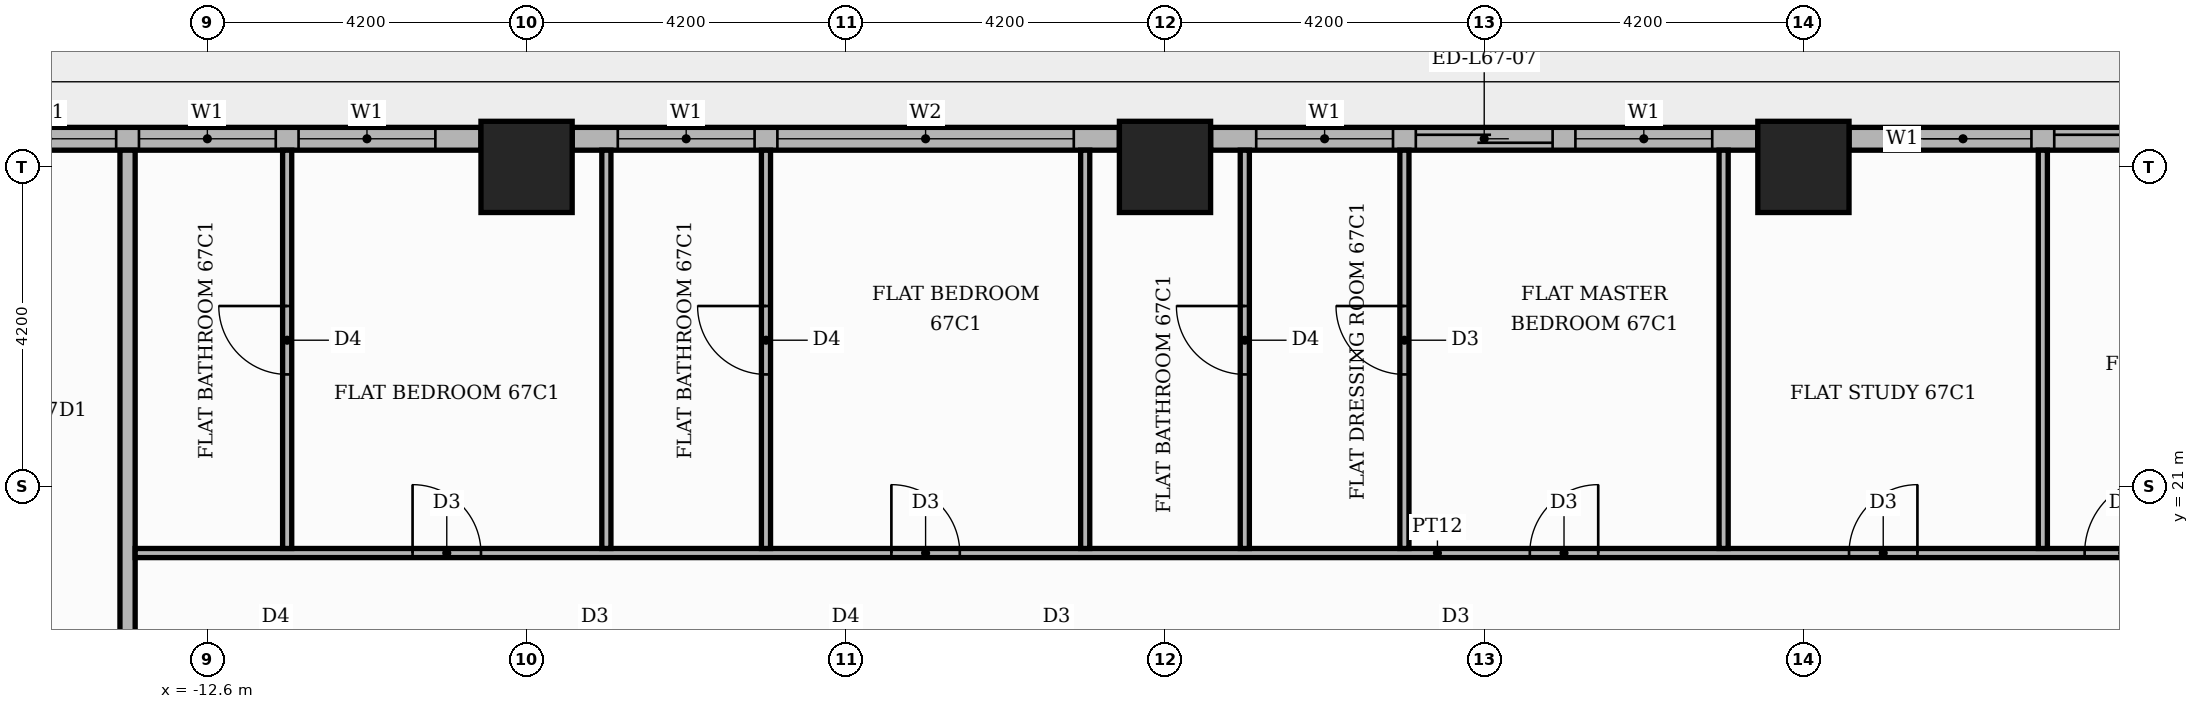
"""IFC4 building model, lengths in metres.
Left out: names, types, materials, properties, quantities, classifications, styles, units other than length and angle.
Written with IfcOpenShell. Run it as: python <this file> out.ifc"""

import sys

from ifc_helpers import new_model, si_unit, direction, frame, frame_2d, origin, origin_2d, place, context, subcontext, project, spatial, rectangle, extrude, element, fill, save


model = new_model("IFC4")
c1 = context("Model", 3, precision=1e-05, world=origin(), true_north=direction((0.0, 1.0)))
c2 = subcontext(c1, "Body", "Model", "MODEL_VIEW")
j1 = project(units=[si_unit("LENGTHUNIT", "METRE"), si_unit("PLANEANGLEUNIT", "RADIAN")], contexts=[c1])
p1 = place(None, origin())
s1 = spatial("IfcSite", under=j1, at=p1, CompositionType="ELEMENT")
p2 = place(p1, origin())
s2 = spatial("IfcBuilding", under=s1, at=p2, CompositionType="ELEMENT")
p3 = place(p2, frame((0.0, 0.0, 279.6)))
s3 = spatial("IfcBuildingStorey", under=s2, at=p3, CompositionType="ELEMENT", Elevation=279.6)
for number, where, z_axis, x_axis in (
    (1, (0.0, 25.2, 0.0), (0.0, 0.0, 1.0), (1.0, 0.0, 0.0)),
    (2, (-8.4, 25.2, 0.0), (0.0, 0.0, 1.0), (1.0, 0.0, 0.0)),
    (3, (8.4, 25.2, 0.0), (0.0, 0.0, 1.0), (1.0, 0.0, 0.0)),
):
    element("IfcColumn", number, at=place(p3, frame(where, z_axis=z_axis, x_axis=x_axis)), inside=s3, PredefinedType="COLUMN", context=c2, shape_type="SweptSolid", body=[
        extrude(rectangle(XDim=1.2, YDim=1.2, at=origin_2d()), origin(), (0.0, 0.0, 1.0), 3.9),
    ])
p4 = place(p3, frame((16.2, 25.57, 0.0), z_axis=(0.0, 0.0, 1.0), x_axis=(-1.0, 0.0, 0.0)))
e4 = element("IfcWall", 4, at=p4, inside=s3, PredefinedType="STANDARD", context=c2, shape_type="SweptSolid", body=[
    extrude(rectangle(XDim=7.2, YDim=0.3, at=frame_2d((3.6, 0.0))), origin(), (0.0, 0.0, 1.0), 3.48),
])
p5 = place(p4, frame((0.6, 0.0, 0.0)))
e5 = element("IfcOpeningElement", 5, at=p5, cuts=e4, PredefinedType="OPENING", context=c2, shape_type="SweptSolid", body=[
    extrude(rectangle(XDim=3.9, YDim=2.4, at=frame_2d((1.95, 1.2))), frame((0.0, 0.16, 0.0), z_axis=(0.0, -1.0, 0.0), x_axis=(1.0, 0.0, 0.0)), (0.0, 0.0, 1.0), 0.32),
])
p6 = place(p4, frame((4.8, 0.0, 0.9)))
e6 = element("IfcOpeningElement", 6, at=p6, cuts=e4, PredefinedType="OPENING", context=c2, shape_type="SweptSolid", body=[
    extrude(rectangle(XDim=1.8, YDim=2.1, at=frame_2d((0.9, 1.05))), frame((0.0, 0.16, 0.0), z_axis=(0.0, -1.0, 0.0), x_axis=(1.0, 0.0, 0.0)), (0.0, 0.0, 1.0), 0.32),
])
p7 = place(p3, frame((7.8, 25.57, 0.0), z_axis=(0.0, 0.0, 1.0), x_axis=(-1.0, 0.0, 0.0)))
e7 = element("IfcWall", 7, at=p7, inside=s3, PredefinedType="STANDARD", context=c2, shape_type="SweptSolid", body=[
    extrude(rectangle(XDim=7.2, YDim=0.3, at=frame_2d((3.6, 0.0))), origin(), (0.0, 0.0, 1.0), 3.48),
])
p8 = place(p7, frame((0.6, 0.0, 0.9)))
e8 = element("IfcOpeningElement", 8, at=p8, cuts=e7, PredefinedType="OPENING", context=c2, shape_type="SweptSolid", body=[
    extrude(rectangle(XDim=1.8, YDim=2.1, at=frame_2d((0.9, 1.05))), frame((0.0, 0.16, 0.0), z_axis=(0.0, -1.0, 0.0), x_axis=(1.0, 0.0, 0.0)), (0.0, 0.0, 1.0), 0.32),
])
p9 = place(p7, frame((2.7, 0.0, 0.0)))
e9 = element("IfcOpeningElement", 9, at=p9, cuts=e7, PredefinedType="OPENING", context=c2, shape_type="SweptSolid", body=[
    extrude(rectangle(XDim=1.8, YDim=2.4, at=frame_2d((0.9, 1.2))), frame((0.0, 0.16, 0.0), z_axis=(0.0, -1.0, 0.0), x_axis=(1.0, 0.0, 0.0)), (0.0, 0.0, 1.0), 0.32),
])
p10 = place(p7, frame((4.8, 0.0, 0.9)))
e10 = element("IfcOpeningElement", 10, at=p10, cuts=e7, PredefinedType="OPENING", context=c2, shape_type="SweptSolid", body=[
    extrude(rectangle(XDim=1.8, YDim=2.1, at=frame_2d((0.9, 1.05))), frame((0.0, 0.16, 0.0), z_axis=(0.0, -1.0, 0.0), x_axis=(1.0, 0.0, 0.0)), (0.0, 0.0, 1.0), 0.32),
])
p11 = place(p3, frame((-0.6, 25.57, 0.0), z_axis=(0.0, 0.0, 1.0), x_axis=(-1.0, 0.0, 0.0)))
e11 = element("IfcWall", 11, at=p11, inside=s3, PredefinedType="STANDARD", context=c2, shape_type="SweptSolid", body=[
    extrude(rectangle(XDim=7.2, YDim=0.3, at=frame_2d((3.6, 0.0))), origin(), (0.0, 0.0, 1.0), 3.48),
])
p12 = place(p11, frame((0.6, 0.0, 0.9)))
e12 = element("IfcOpeningElement", 12, at=p12, cuts=e11, PredefinedType="OPENING", context=c2, shape_type="SweptSolid", body=[
    extrude(rectangle(XDim=3.9, YDim=2.1, at=frame_2d((1.95, 1.05))), frame((0.0, 0.16, 0.0), z_axis=(0.0, -1.0, 0.0), x_axis=(1.0, 0.0, 0.0)), (0.0, 0.0, 1.0), 0.32),
])
p13 = place(p11, frame((4.8, 0.0, 0.9)))
e13 = element("IfcOpeningElement", 13, at=p13, cuts=e11, PredefinedType="OPENING", context=c2, shape_type="SweptSolid", body=[
    extrude(rectangle(XDim=1.8, YDim=2.1, at=frame_2d((0.9, 1.05))), frame((0.0, 0.16, 0.0), z_axis=(0.0, -1.0, 0.0), x_axis=(1.0, 0.0, 0.0)), (0.0, 0.0, 1.0), 0.32),
])
p14 = place(p3, frame((-9.0, 25.57, 0.0), z_axis=(0.0, 0.0, 1.0), x_axis=(-1.0, 0.0, 0.0)))
e14 = element("IfcWall", 14, at=p14, inside=s3, PredefinedType="STANDARD", context=c2, shape_type="SweptSolid", body=[
    extrude(rectangle(XDim=7.2, YDim=0.3, at=frame_2d((3.6, 0.0))), origin(), (0.0, 0.0, 1.0), 3.48),
])
p15 = place(p14, frame((0.6, 0.0, 0.9)))
e15 = element("IfcOpeningElement", 15, at=p15, cuts=e14, PredefinedType="OPENING", context=c2, shape_type="SweptSolid", body=[
    extrude(rectangle(XDim=1.8, YDim=2.1, at=frame_2d((0.9, 1.05))), frame((0.0, 0.16, 0.0), z_axis=(0.0, -1.0, 0.0), x_axis=(1.0, 0.0, 0.0)), (0.0, 0.0, 1.0), 0.32),
])
p16 = place(p14, frame((2.7, 0.0, 0.9)))
e16 = element("IfcOpeningElement", 16, at=p16, cuts=e14, PredefinedType="OPENING", context=c2, shape_type="SweptSolid", body=[
    extrude(rectangle(XDim=1.8, YDim=2.1, at=frame_2d((0.9, 1.05))), frame((0.0, 0.16, 0.0), z_axis=(0.0, -1.0, 0.0), x_axis=(1.0, 0.0, 0.0)), (0.0, 0.0, 1.0), 0.32),
])
p17 = place(p14, frame((4.8, 0.0, 0.9)))
e17 = element("IfcOpeningElement", 17, at=p17, cuts=e14, PredefinedType="OPENING", context=c2, shape_type="SweptSolid", body=[
    extrude(rectangle(XDim=1.8, YDim=2.1, at=frame_2d((0.9, 1.05))), frame((0.0, 0.16, 0.0), z_axis=(0.0, -1.0, 0.0), x_axis=(1.0, 0.0, 0.0)), (0.0, 0.0, 1.0), 0.32),
])
p18 = place(p3, frame((-13.65, 13.75, 0.0), z_axis=(0.0, 0.0, 1.0), x_axis=(0.0, 1.0, 0.0)))
e18 = element("IfcWall", 18, at=p18, inside=s3, PredefinedType="PARTITIONING", context=c2, shape_type="SweptSolid", body=[
    extrude(rectangle(XDim=11.67, YDim=0.2, at=frame_2d((5.835, 0.0))), origin(), (0.0, 0.0, 1.0), 3.48),
])
p19 = place(p3, frame((-13.55, 20.12, 0.0), z_axis=(0.0, 0.0, 1.0), x_axis=(1.0, 0.0, 0.0)))
e19 = element("IfcWall", 19, at=p19, inside=s3, PredefinedType="PARTITIONING", context=c2, shape_type="SweptSolid", body=[
    extrude(rectangle(XDim=34.269, YDim=0.12, at=frame_2d((17.135, 0.0))), origin(), (0.0, 0.0, 1.0), 3.48),
])
p20 = place(p19, frame((25.65, 0.0, 0.0)))
e20 = element("IfcOpeningElement", 20, at=p20, cuts=e19, PredefinedType="OPENING", context=c2, shape_type="SweptSolid", body=[
    extrude(rectangle(XDim=1.0, YDim=2.1, at=frame_2d((0.5, 1.05))), frame((0.0, 0.07, 0.0), z_axis=(0.0, -1.0, 0.0), x_axis=(1.0, 0.0, 0.0)), (0.0, 0.0, 1.0), 0.14),
])
p21 = place(p19, frame((22.55, 0.0, 0.0)))
e21 = element("IfcOpeningElement", 21, at=p21, cuts=e19, PredefinedType="OPENING", context=c2, shape_type="SweptSolid", body=[
    extrude(rectangle(XDim=0.9, YDim=2.1, at=frame_2d((0.45, 1.05))), frame((0.0, 0.07, 0.0), z_axis=(0.0, -1.0, 0.0), x_axis=(1.0, 0.0, 0.0)), (0.0, 0.0, 1.0), 0.14),
])
p22 = place(p19, frame((18.35, 0.0, 0.0)))
e22 = element("IfcOpeningElement", 22, at=p22, cuts=e19, PredefinedType="OPENING", context=c2, shape_type="SweptSolid", body=[
    extrude(rectangle(XDim=0.9, YDim=2.1, at=frame_2d((0.45, 1.05))), frame((0.0, 0.07, 0.0), z_axis=(0.0, -1.0, 0.0), x_axis=(1.0, 0.0, 0.0)), (0.0, 0.0, 1.0), 0.14),
])
p23 = place(p19, frame((9.95, 0.0, 0.0)))
e23 = element("IfcOpeningElement", 23, at=p23, cuts=e19, PredefinedType="OPENING", context=c2, shape_type="SweptSolid", body=[
    extrude(rectangle(XDim=0.9, YDim=2.1, at=frame_2d((0.45, 1.05))), frame((0.0, 0.07, 0.0), z_axis=(0.0, -1.0, 0.0), x_axis=(1.0, 0.0, 0.0)), (0.0, 0.0, 1.0), 0.14),
])
p24 = place(p19, frame((3.65, 0.0, 0.0)))
e24 = element("IfcOpeningElement", 24, at=p24, cuts=e19, PredefinedType="OPENING", context=c2, shape_type="SweptSolid", body=[
    extrude(rectangle(XDim=0.9, YDim=2.1, at=frame_2d((0.45, 1.05))), frame((0.0, 0.07, 0.0), z_axis=(0.0, -1.0, 0.0), x_axis=(1.0, 0.0, 0.0)), (0.0, 0.0, 1.0), 0.14),
])
p25 = place(p3, frame((-11.55, 20.18, 0.0), z_axis=(0.0, 0.0, 1.0), x_axis=(0.0, 1.0, 0.0)))
e25 = element("IfcWall", 25, at=p25, inside=s3, PredefinedType="PARTITIONING", context=c2, shape_type="SweptSolid", body=[
    extrude(rectangle(XDim=5.24, YDim=0.12, at=frame_2d((2.62, 0.0))), origin(), (0.0, 0.0, 1.0), 3.48),
])
p26 = place(p25, frame((2.29, 0.0, 0.0)))
e26 = element("IfcOpeningElement", 26, at=p26, cuts=e25, PredefinedType="OPENING", context=c2, shape_type="SweptSolid", body=[
    extrude(rectangle(XDim=0.9, YDim=2.1, at=frame_2d((0.45, 1.05))), frame((0.0, 0.07, 0.0), z_axis=(0.0, -1.0, 0.0), x_axis=(1.0, 0.0, 0.0)), (0.0, 0.0, 1.0), 0.14),
])
p27 = place(p3, frame((-7.35, 20.18, 0.0), z_axis=(0.0, 0.0, 1.0), x_axis=(0.0, 1.0, 0.0)))
e27 = element("IfcWall", 27, at=p27, inside=s3, PredefinedType="PARTITIONING", context=c2, shape_type="SweptSolid", body=[
    extrude(rectangle(XDim=5.24, YDim=0.12, at=frame_2d((2.62, 0.0))), origin(), (0.0, 0.0, 1.0), 3.48),
])
p28 = place(p3, frame((-5.25, 20.18, 0.0), z_axis=(0.0, 0.0, 1.0), x_axis=(0.0, 1.0, 0.0)))
e28 = element("IfcWall", 28, at=p28, inside=s3, PredefinedType="PARTITIONING", context=c2, shape_type="SweptSolid", body=[
    extrude(rectangle(XDim=5.24, YDim=0.12, at=frame_2d((2.62, 0.0))), origin(), (0.0, 0.0, 1.0), 3.48),
])
p29 = place(p28, frame((2.29, 0.0, 0.0)))
e29 = element("IfcOpeningElement", 29, at=p29, cuts=e28, PredefinedType="OPENING", context=c2, shape_type="SweptSolid", body=[
    extrude(rectangle(XDim=0.9, YDim=2.1, at=frame_2d((0.45, 1.05))), frame((0.0, 0.07, 0.0), z_axis=(0.0, -1.0, 0.0), x_axis=(1.0, 0.0, 0.0)), (0.0, 0.0, 1.0), 0.14),
])
p30 = place(p3, frame((-1.05, 20.18, 0.0), z_axis=(0.0, 0.0, 1.0), x_axis=(0.0, 1.0, 0.0)))
e30 = element("IfcWall", 30, at=p30, inside=s3, PredefinedType="PARTITIONING", context=c2, shape_type="SweptSolid", body=[
    extrude(rectangle(XDim=5.24, YDim=0.12, at=frame_2d((2.62, 0.0))), origin(), (0.0, 0.0, 1.0), 3.48),
])
p31 = place(p3, frame((1.05, 20.18, 0.0), z_axis=(0.0, 0.0, 1.0), x_axis=(0.0, 1.0, 0.0)))
e31 = element("IfcWall", 31, at=p31, inside=s3, PredefinedType="PARTITIONING", context=c2, shape_type="SweptSolid", body=[
    extrude(rectangle(XDim=5.24, YDim=0.12, at=frame_2d((2.62, 0.0))), origin(), (0.0, 0.0, 1.0), 3.48),
])
p32 = place(p31, frame((2.29, 0.0, 0.0)))
e32 = element("IfcOpeningElement", 32, at=p32, cuts=e31, PredefinedType="OPENING", context=c2, shape_type="SweptSolid", body=[
    extrude(rectangle(XDim=0.9, YDim=2.1, at=frame_2d((0.45, 1.05))), frame((0.0, 0.07, 0.0), z_axis=(0.0, -1.0, 0.0), x_axis=(1.0, 0.0, 0.0)), (0.0, 0.0, 1.0), 0.14),
])
p33 = place(p3, frame((3.15, 20.18, 0.0), z_axis=(0.0, 0.0, 1.0), x_axis=(0.0, 1.0, 0.0)))
e33 = element("IfcWall", 33, at=p33, inside=s3, PredefinedType="PARTITIONING", context=c2, shape_type="SweptSolid", body=[
    extrude(rectangle(XDim=5.24, YDim=0.12, at=frame_2d((2.62, 0.0))), origin(), (0.0, 0.0, 1.0), 3.48),
])
p34 = place(p33, frame((2.29, 0.0, 0.0)))
e34 = element("IfcOpeningElement", 34, at=p34, cuts=e33, PredefinedType="OPENING", context=c2, shape_type="SweptSolid", body=[
    extrude(rectangle(XDim=0.9, YDim=2.1, at=frame_2d((0.45, 1.05))), frame((0.0, 0.07, 0.0), z_axis=(0.0, -1.0, 0.0), x_axis=(1.0, 0.0, 0.0)), (0.0, 0.0, 1.0), 0.14),
])
for number, where, z_axis, x_axis in (
    (35, (7.35, 20.18, 0.0), (0.0, 0.0, 1.0), (0.0, 1.0, 0.0)),
    (36, (11.55, 20.18, 0.0), (0.0, 0.0, 1.0), (0.0, 1.0, 0.0)),
):
    element("IfcWall", number, at=place(p3, frame(where, z_axis=z_axis, x_axis=x_axis)), inside=s3, PredefinedType="PARTITIONING", context=c2, shape_type="SweptSolid", body=[
        extrude(rectangle(XDim=5.24, YDim=0.12, at=frame_2d((2.62, 0.0))), origin(), (0.0, 0.0, 1.0), 3.48),
    ])
p35 = place(p5, origin())
e37 = element("IfcDoor", 37, at=p35, inside=s3, OperationType="SLIDING_TO_LEFT", PredefinedType="DOOR", context=c2, shape_type="SweptSolid", body=[
    extrude(rectangle(XDim=3.9, YDim=2.4, at=frame_2d((1.95, 1.2))), frame((0.0, 0.025, 0.0), z_axis=(0.0, -1.0, 0.0), x_axis=(1.0, 0.0, 0.0)), (0.0, 0.0, 1.0), 0.05),
])
fill(e5, e37)
p36 = place(p6, origin())
e38 = element("IfcWindow", 38, at=p36, inside=s3, PartitioningType="SINGLE_PANEL", PredefinedType="WINDOW", context=c2, shape_type="SweptSolid", body=[
    extrude(rectangle(XDim=1.8, YDim=2.1, at=frame_2d((0.9, 1.05))), frame((0.0, 0.03, 0.0), z_axis=(0.0, -1.0, 0.0), x_axis=(1.0, 0.0, 0.0)), (0.0, 0.0, 1.0), 0.06),
])
fill(e6, e38)
p37 = place(p8, origin())
e39 = element("IfcWindow", 39, at=p37, inside=s3, PartitioningType="SINGLE_PANEL", PredefinedType="WINDOW", context=c2, shape_type="SweptSolid", body=[
    extrude(rectangle(XDim=1.8, YDim=2.1, at=frame_2d((0.9, 1.05))), frame((0.0, 0.03, 0.0), z_axis=(0.0, -1.0, 0.0), x_axis=(1.0, 0.0, 0.0)), (0.0, 0.0, 1.0), 0.06),
])
fill(e8, e39)
p38 = place(p9, origin())
e40 = element("IfcDoor", 40, at=p38, inside=s3, OperationType="SLIDING_TO_LEFT", PredefinedType="DOOR", context=c2, shape_type="SweptSolid", body=[
    extrude(rectangle(XDim=1.8, YDim=2.4, at=frame_2d((0.9, 1.2))), frame((0.0, 0.025, 0.0), z_axis=(0.0, -1.0, 0.0), x_axis=(1.0, 0.0, 0.0)), (0.0, 0.0, 1.0), 0.05),
])
fill(e9, e40)
p39 = place(p10, origin())
e41 = element("IfcWindow", 41, at=p39, inside=s3, PartitioningType="SINGLE_PANEL", PredefinedType="WINDOW", context=c2, shape_type="SweptSolid", body=[
    extrude(rectangle(XDim=1.8, YDim=2.1, at=frame_2d((0.9, 1.05))), frame((0.0, 0.03, 0.0), z_axis=(0.0, -1.0, 0.0), x_axis=(1.0, 0.0, 0.0)), (0.0, 0.0, 1.0), 0.06),
])
fill(e10, e41)
p40 = place(p12, origin())
e42 = element("IfcWindow", 42, at=p40, inside=s3, PartitioningType="SINGLE_PANEL", PredefinedType="WINDOW", context=c2, shape_type="SweptSolid", body=[
    extrude(rectangle(XDim=3.9, YDim=2.1, at=frame_2d((1.95, 1.05))), frame((0.0, 0.03, 0.0), z_axis=(0.0, -1.0, 0.0), x_axis=(1.0, 0.0, 0.0)), (0.0, 0.0, 1.0), 0.06),
])
fill(e12, e42)
p41 = place(p13, origin())
e43 = element("IfcWindow", 43, at=p41, inside=s3, PartitioningType="SINGLE_PANEL", PredefinedType="WINDOW", context=c2, shape_type="SweptSolid", body=[
    extrude(rectangle(XDim=1.8, YDim=2.1, at=frame_2d((0.9, 1.05))), frame((0.0, 0.03, 0.0), z_axis=(0.0, -1.0, 0.0), x_axis=(1.0, 0.0, 0.0)), (0.0, 0.0, 1.0), 0.06),
])
fill(e13, e43)
p42 = place(p15, origin())
e44 = element("IfcWindow", 44, at=p42, inside=s3, PartitioningType="SINGLE_PANEL", PredefinedType="WINDOW", context=c2, shape_type="SweptSolid", body=[
    extrude(rectangle(XDim=1.8, YDim=2.1, at=frame_2d((0.9, 1.05))), frame((0.0, 0.03, 0.0), z_axis=(0.0, -1.0, 0.0), x_axis=(1.0, 0.0, 0.0)), (0.0, 0.0, 1.0), 0.06),
])
fill(e15, e44)
p43 = place(p16, origin())
e45 = element("IfcWindow", 45, at=p43, inside=s3, PartitioningType="SINGLE_PANEL", PredefinedType="WINDOW", context=c2, shape_type="SweptSolid", body=[
    extrude(rectangle(XDim=1.8, YDim=2.1, at=frame_2d((0.9, 1.05))), frame((0.0, 0.03, 0.0), z_axis=(0.0, -1.0, 0.0), x_axis=(1.0, 0.0, 0.0)), (0.0, 0.0, 1.0), 0.06),
])
fill(e16, e45)
p44 = place(p17, origin())
e46 = element("IfcWindow", 46, at=p44, inside=s3, PartitioningType="SINGLE_PANEL", PredefinedType="WINDOW", context=c2, shape_type="SweptSolid", body=[
    extrude(rectangle(XDim=1.8, YDim=2.1, at=frame_2d((0.9, 1.05))), frame((0.0, 0.03, 0.0), z_axis=(0.0, -1.0, 0.0), x_axis=(1.0, 0.0, 0.0)), (0.0, 0.0, 1.0), 0.06),
])
fill(e17, e46)
p45 = place(p20, origin())
e47 = element("IfcDoor", 47, at=p45, inside=s3, OperationType="SINGLE_SWING_RIGHT", PredefinedType="DOOR", context=c2, shape_type="SweptSolid", body=[
    extrude(rectangle(XDim=1.0, YDim=2.1, at=frame_2d((0.5, 1.05))), frame((0.0, 0.025, 0.0), z_axis=(0.0, -1.0, 0.0), x_axis=(1.0, 0.0, 0.0)), (0.0, 0.0, 1.0), 0.05),
])
fill(e20, e47)
p46 = place(p21, origin())
e48 = element("IfcDoor", 48, at=p46, inside=s3, OperationType="SINGLE_SWING_RIGHT", PredefinedType="DOOR", context=c2, shape_type="SweptSolid", body=[
    extrude(rectangle(XDim=0.9, YDim=2.1, at=frame_2d((0.45, 1.05))), frame((0.0, 0.025, 0.0), z_axis=(0.0, -1.0, 0.0), x_axis=(1.0, 0.0, 0.0)), (0.0, 0.0, 1.0), 0.05),
])
fill(e21, e48)
p47 = place(p22, origin())
e49 = element("IfcDoor", 49, at=p47, inside=s3, OperationType="SINGLE_SWING_RIGHT", PredefinedType="DOOR", context=c2, shape_type="SweptSolid", body=[
    extrude(rectangle(XDim=0.9, YDim=2.1, at=frame_2d((0.45, 1.05))), frame((0.0, 0.025, 0.0), z_axis=(0.0, -1.0, 0.0), x_axis=(1.0, 0.0, 0.0)), (0.0, 0.0, 1.0), 0.05),
])
fill(e22, e49)
p48 = place(p34, origin())
e50 = element("IfcDoor", 50, at=p48, inside=s3, OperationType="SINGLE_SWING_RIGHT", PredefinedType="DOOR", context=c2, shape_type="SweptSolid", body=[
    extrude(rectangle(XDim=0.9, YDim=2.1, at=frame_2d((0.45, 1.05))), frame((0.0, 0.025, 0.0), z_axis=(0.0, -1.0, 0.0), x_axis=(1.0, 0.0, 0.0)), (0.0, 0.0, 1.0), 0.05),
])
fill(e34, e50)
p49 = place(p32, origin())
e51 = element("IfcDoor", 51, at=p49, inside=s3, OperationType="SINGLE_SWING_RIGHT", PredefinedType="DOOR", context=c2, shape_type="SweptSolid", body=[
    extrude(rectangle(XDim=0.9, YDim=2.1, at=frame_2d((0.45, 1.05))), frame((0.0, 0.025, 0.0), z_axis=(0.0, -1.0, 0.0), x_axis=(1.0, 0.0, 0.0)), (0.0, 0.0, 1.0), 0.05),
])
fill(e32, e51)
p50 = place(p23, origin())
e52 = element("IfcDoor", 52, at=p50, inside=s3, OperationType="SINGLE_SWING_LEFT", PredefinedType="DOOR", context=c2, shape_type="SweptSolid", body=[
    extrude(rectangle(XDim=0.9, YDim=2.1, at=frame_2d((0.45, 1.05))), frame((0.0, 0.025, 0.0), z_axis=(0.0, -1.0, 0.0), x_axis=(1.0, 0.0, 0.0)), (0.0, 0.0, 1.0), 0.05),
])
fill(e23, e52)
p51 = place(p29, origin())
e53 = element("IfcDoor", 53, at=p51, inside=s3, OperationType="SINGLE_SWING_RIGHT", PredefinedType="DOOR", context=c2, shape_type="SweptSolid", body=[
    extrude(rectangle(XDim=0.9, YDim=2.1, at=frame_2d((0.45, 1.05))), frame((0.0, 0.025, 0.0), z_axis=(0.0, -1.0, 0.0), x_axis=(1.0, 0.0, 0.0)), (0.0, 0.0, 1.0), 0.05),
])
fill(e29, e53)
p52 = place(p24, origin())
e54 = element("IfcDoor", 54, at=p52, inside=s3, OperationType="SINGLE_SWING_LEFT", PredefinedType="DOOR", context=c2, shape_type="SweptSolid", body=[
    extrude(rectangle(XDim=0.9, YDim=2.1, at=frame_2d((0.45, 1.05))), frame((0.0, 0.025, 0.0), z_axis=(0.0, -1.0, 0.0), x_axis=(1.0, 0.0, 0.0)), (0.0, 0.0, 1.0), 0.05),
])
fill(e24, e54)
p53 = place(p26, origin())
e55 = element("IfcDoor", 55, at=p53, inside=s3, OperationType="SINGLE_SWING_RIGHT", PredefinedType="DOOR", context=c2, shape_type="SweptSolid", body=[
    extrude(rectangle(XDim=0.9, YDim=2.1, at=frame_2d((0.45, 1.05))), frame((0.0, 0.025, 0.0), z_axis=(0.0, -1.0, 0.0), x_axis=(1.0, 0.0, 0.0)), (0.0, 0.0, 1.0), 0.05),
])
fill(e26, e55)
save(model, sys.argv[1])
